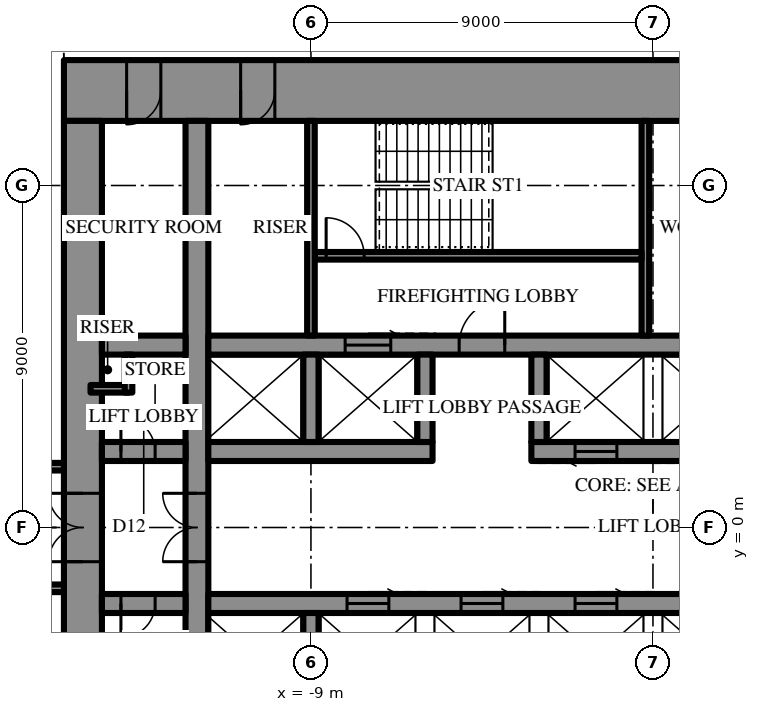
"""IFC4 building model, lengths in metres.
Left out: names, types, materials, properties, quantities, classifications, styles, units other than length and angle.
Written with IfcOpenShell. Run it as: python <this file> out.ifc"""

import sys

from ifc_helpers import new_model, si_unit, direction, frame, frame_2d, origin, place, context, subcontext, project, spatial, rectangle, extrude, element, fill, save


model = new_model("IFC4")
c1 = context("Model", 3, precision=1e-05, world=origin(), true_north=direction((0.0, 1.0)))
c2 = subcontext(c1, "Body", "Model", "MODEL_VIEW")
j1 = project(units=[si_unit("LENGTHUNIT", "METRE"), si_unit("PLANEANGLEUNIT", "RADIAN")], contexts=[c1])
p1 = place(None, origin())
s1 = spatial("IfcSite", under=j1, at=p1, CompositionType="ELEMENT")
p2 = place(p1, origin())
s2 = spatial("IfcBuilding", under=s1, at=p2, CompositionType="ELEMENT")
p3 = place(p2, frame((0.0, 0.0, 295.3)))
s3 = spatial("IfcBuildingStorey", under=s2, at=p3, CompositionType="ELEMENT", Elevation=295.3)
p4 = place(p3, frame((-15.5, 11.5, 0.0), z_axis=(0.0, 0.0, 1.0), x_axis=(1.0, 0.0, 0.0)))
e1 = element("IfcWall", 1, at=p4, inside=s3, PredefinedType="SHEAR", context=c2, shape_type="SweptSolid", body=[
    extrude(rectangle(XDim=31.0, YDim=1.6, at=frame_2d((15.5, 0.0))), origin(), (0.0, 0.0, 1.0), 4.2),
])
p5 = place(p4, frame((16.35, 0.0, 0.0)))
e2 = element("IfcOpeningElement", 2, at=p5, cuts=e1, PredefinedType="OPENING", context=c2, shape_type="SweptSolid", body=[
    extrude(rectangle(XDim=0.9, YDim=2.2, at=frame_2d((0.45, 1.1))), frame((0.0, 0.81, 0.0), z_axis=(0.0, -1.0, 0.0), x_axis=(1.0, 0.0, 0.0)), (0.0, 0.0, 1.0), 1.62),
])
p6 = place(p4, frame((19.35, 0.0, 0.0)))
e3 = element("IfcOpeningElement", 3, at=p6, cuts=e1, PredefinedType="OPENING", context=c2, shape_type="SweptSolid", body=[
    extrude(rectangle(XDim=0.9, YDim=2.2, at=frame_2d((0.45, 1.1))), frame((0.0, 0.81, 0.0), z_axis=(0.0, -1.0, 0.0), x_axis=(1.0, 0.0, 0.0)), (0.0, 0.0, 1.0), 1.62),
])
p7 = place(p4, frame((22.4, 0.0, 0.0)))
e4 = element("IfcOpeningElement", 4, at=p7, cuts=e1, PredefinedType="OPENING", context=c2, shape_type="SweptSolid", body=[
    extrude(rectangle(XDim=1.0, YDim=2.2, at=frame_2d((0.5, 1.1))), frame((0.0, 0.81, 0.0), z_axis=(0.0, -1.0, 0.0), x_axis=(1.0, 0.0, 0.0)), (0.0, 0.0, 1.0), 1.62),
])
p8 = place(p4, frame((1.65, 0.0, 0.0)))
e5 = element("IfcOpeningElement", 5, at=p8, cuts=e1, PredefinedType="OPENING", context=c2, shape_type="SweptSolid", body=[
    extrude(rectangle(XDim=0.9, YDim=2.2, at=frame_2d((0.45, 1.1))), frame((0.0, 0.81, 0.0), z_axis=(0.0, -1.0, 0.0), x_axis=(1.0, 0.0, 0.0)), (0.0, 0.0, 1.0), 1.62),
])
p9 = place(p4, frame((4.65, 0.0, 0.0)))
e6 = element("IfcOpeningElement", 6, at=p9, cuts=e1, PredefinedType="OPENING", context=c2, shape_type="SweptSolid", body=[
    extrude(rectangle(XDim=0.9, YDim=2.2, at=frame_2d((0.45, 1.1))), frame((0.0, 0.81, 0.0), z_axis=(0.0, -1.0, 0.0), x_axis=(1.0, 0.0, 0.0)), (0.0, 0.0, 1.0), 1.62),
])
p10 = place(p4, frame((25.45, 0.0, 0.0)))
e7 = element("IfcOpeningElement", 7, at=p10, cuts=e1, PredefinedType="OPENING", context=c2, shape_type="SweptSolid", body=[
    extrude(rectangle(XDim=0.9, YDim=2.2, at=frame_2d((0.45, 1.1))), frame((0.0, 0.81, 0.0), z_axis=(0.0, -1.0, 0.0), x_axis=(1.0, 0.0, 0.0)), (0.0, 0.0, 1.0), 1.62),
])
p11 = place(p4, frame((28.45, 0.0, 0.0)))
e8 = element("IfcOpeningElement", 8, at=p11, cuts=e1, PredefinedType="OPENING", context=c2, shape_type="SweptSolid", body=[
    extrude(rectangle(XDim=0.9, YDim=2.2, at=frame_2d((0.45, 1.1))), frame((0.0, 0.81, 0.0), z_axis=(0.0, -1.0, 0.0), x_axis=(1.0, 0.0, 0.0)), (0.0, 0.0, 1.0), 1.62),
])
p12 = place(p3, frame((-15.0, 10.7, 0.0), z_axis=(0.0, 0.0, 1.0), x_axis=(0.0, -1.0, 0.0)))
e9 = element("IfcWall", 9, at=p12, inside=s3, PredefinedType="SHEAR", context=c2, shape_type="SweptSolid", body=[
    extrude(rectangle(XDim=21.4, YDim=1.0, at=frame_2d((10.7, 0.0))), origin(), (0.0, 0.0, 1.0), 4.2),
])
p13 = place(p12, frame((9.8, 0.0, 0.0)))
e10 = element("IfcOpeningElement", 10, at=p13, cuts=e9, PredefinedType="OPENING", context=c2, shape_type="SweptSolid", body=[
    extrude(rectangle(XDim=1.8, YDim=2.4, at=frame_2d((0.9, 1.2))), frame((0.0, 0.51, 0.0), z_axis=(0.0, -1.0, 0.0), x_axis=(1.0, 0.0, 0.0)), (0.0, 0.0, 1.0), 1.02),
])
p14 = place(p3, frame((-12.0, -10.7, 0.0), z_axis=(0.0, 0.0, 1.0), x_axis=(0.0, 1.0, 0.0)))
e11 = element("IfcWall", 11, at=p14, inside=s3, PredefinedType="SHEAR", context=c2, shape_type="SweptSolid", body=[
    extrude(rectangle(XDim=21.4, YDim=0.6, at=frame_2d((10.7, 0.0))), origin(), (0.0, 0.0, 1.0), 4.2),
])
p15 = place(p14, frame((9.8, 0.0, 0.0)))
e12 = element("IfcOpeningElement", 12, at=p15, cuts=e11, PredefinedType="OPENING", context=c2, shape_type="SweptSolid", body=[
    extrude(rectangle(XDim=1.8, YDim=2.4, at=frame_2d((0.9, 1.2))), frame((0.0, 0.31, 0.0), z_axis=(0.0, -1.0, 0.0), x_axis=(1.0, 0.0, 0.0)), (0.0, 0.0, 1.0), 0.62),
])
p16 = place(p3, frame((-14.5, 2.0, 0.0), z_axis=(0.0, 0.0, 1.0), x_axis=(1.0, 0.0, 0.0)))
e13 = element("IfcWall", 13, at=p16, inside=s3, PredefinedType="SHEAR", context=c2, shape_type="SweptSolid", body=[
    extrude(rectangle(XDim=2.2, YDim=0.5, at=frame_2d((1.1, 0.0))), origin(), (0.0, 0.0, 1.0), 4.2),
])
p17 = place(p16, frame((0.5, 0.0, 0.0)))
e14 = element("IfcOpeningElement", 14, at=p17, cuts=e13, PredefinedType="OPENING", context=c2, shape_type="SweptSolid", body=[
    extrude(rectangle(XDim=0.9, YDim=2.2, at=frame_2d((0.45, 1.1))), frame((0.0, 0.26, 0.0), z_axis=(0.0, -1.0, 0.0), x_axis=(1.0, 0.0, 0.0)), (0.0, 0.0, 1.0), 0.52),
])
p18 = place(p3, frame((-11.7, 2.0, 0.0), z_axis=(0.0, 0.0, 1.0), x_axis=(1.0, 0.0, 0.0)))
e15 = element("IfcWall", 15, at=p18, inside=s3, PredefinedType="SHEAR", context=c2, shape_type="SweptSolid", body=[
    extrude(rectangle(XDim=5.9, YDim=0.5, at=frame_2d((2.95, 0.0))), origin(), (0.0, 0.0, 1.0), 4.2),
])
p19 = place(p3, frame((-3.2, 2.0, 0.0), z_axis=(0.0, 0.0, 1.0), x_axis=(1.0, 0.0, 0.0)))
e16 = element("IfcWall", 16, at=p19, inside=s3, PredefinedType="SHEAR", context=c2, shape_type="SweptSolid", body=[
    extrude(rectangle(XDim=14.9, YDim=0.5, at=frame_2d((7.45, 0.0))), origin(), (0.0, 0.0, 1.0), 4.2),
])
p20 = place(p19, frame((1.15, 0.0, 0.0)))
e17 = element("IfcOpeningElement", 17, at=p20, cuts=e16, PredefinedType="OPENING", context=c2, shape_type="SweptSolid", body=[
    extrude(rectangle(XDim=1.1, YDim=2.2, at=frame_2d((0.55, 1.1))), frame((0.0, 0.26, 0.0), z_axis=(0.0, -1.0, 0.0), x_axis=(1.0, 0.0, 0.0)), (0.0, 0.0, 1.0), 0.52),
])
p21 = place(p19, frame((4.15, 0.0, 0.0)))
e18 = element("IfcOpeningElement", 18, at=p21, cuts=e16, PredefinedType="OPENING", context=c2, shape_type="SweptSolid", body=[
    extrude(rectangle(XDim=1.1, YDim=2.2, at=frame_2d((0.55, 1.1))), frame((0.0, 0.26, 0.0), z_axis=(0.0, -1.0, 0.0), x_axis=(1.0, 0.0, 0.0)), (0.0, 0.0, 1.0), 0.52),
])
p22 = place(p19, frame((7.15, 0.0, 0.0)))
e19 = element("IfcOpeningElement", 19, at=p22, cuts=e16, PredefinedType="OPENING", context=c2, shape_type="SweptSolid", body=[
    extrude(rectangle(XDim=1.1, YDim=2.2, at=frame_2d((0.55, 1.1))), frame((0.0, 0.26, 0.0), z_axis=(0.0, -1.0, 0.0), x_axis=(1.0, 0.0, 0.0)), (0.0, 0.0, 1.0), 0.52),
])
p23 = place(p19, frame((10.15, 0.0, 0.0)))
e20 = element("IfcOpeningElement", 20, at=p23, cuts=e16, PredefinedType="OPENING", context=c2, shape_type="SweptSolid", body=[
    extrude(rectangle(XDim=1.1, YDim=2.2, at=frame_2d((0.55, 1.1))), frame((0.0, 0.26, 0.0), z_axis=(0.0, -1.0, 0.0), x_axis=(1.0, 0.0, 0.0)), (0.0, 0.0, 1.0), 0.52),
])
p24 = place(p3, frame((-14.5, 4.8, 0.0), z_axis=(0.0, 0.0, 1.0), x_axis=(1.0, 0.0, 0.0)))
e21 = element("IfcWall", 21, at=p24, inside=s3, PredefinedType="SHEAR", context=c2, shape_type="SweptSolid", body=[
    extrude(rectangle(XDim=2.2, YDim=0.5, at=frame_2d((1.1, 0.0))), origin(), (0.0, 0.0, 1.0), 4.2),
])
p25 = place(p3, frame((-11.7, 4.8, 0.0), z_axis=(0.0, 0.0, 1.0), x_axis=(1.0, 0.0, 0.0)))
e22 = element("IfcWall", 22, at=p25, inside=s3, PredefinedType="SHEAR", context=c2, shape_type="SweptSolid", body=[
    extrude(rectangle(XDim=23.4, YDim=0.5, at=frame_2d((11.7, 0.0))), origin(), (0.0, 0.0, 1.0), 4.2),
])
p26 = place(p25, frame((6.6, 0.0, 0.0)))
e23 = element("IfcOpeningElement", 23, at=p26, cuts=e22, PredefinedType="OPENING", context=c2, shape_type="SweptSolid", body=[
    extrude(rectangle(XDim=1.2, YDim=2.2, at=frame_2d((0.6, 1.1))), frame((0.0, 0.26, 0.0), z_axis=(0.0, -1.0, 0.0), x_axis=(1.0, 0.0, 0.0)), (0.0, 0.0, 1.0), 0.52),
])
p27 = place(p25, frame((3.6, 0.0, 0.0)))
e24 = element("IfcOpeningElement", 24, at=p27, cuts=e22, PredefinedType="OPENING", context=c2, shape_type="SweptSolid", body=[
    extrude(rectangle(XDim=1.2, YDim=2.2, at=frame_2d((0.6, 1.1))), frame((0.0, 0.26, 0.0), z_axis=(0.0, -1.0, 0.0), x_axis=(1.0, 0.0, 0.0)), (0.0, 0.0, 1.0), 0.52),
])
for number, where, z_axis, x_axis in (
    (25, (-9.0, 2.25, 0.0), (0.0, 0.0, 1.0), (0.0, 1.0, 0.0)),
    (26, (-6.0, 2.25, 0.0), (0.0, 0.0, 1.0), (0.0, 1.0, 0.0)),
    (27, (-3.0, 2.25, 0.0), (0.0, 0.0, 1.0), (0.0, 1.0, 0.0)),
):
    element("IfcWall", number, at=place(p3, frame(where, z_axis=z_axis, x_axis=x_axis)), inside=s3, PredefinedType="SHEAR", context=c2, shape_type="SweptSolid", body=[
        extrude(rectangle(XDim=2.3, YDim=0.4, at=frame_2d((1.15, 0.0))), origin(), (0.0, 0.0, 1.0), 4.2),
    ])
p28 = place(p3, frame((-0.2, 5.05, 0.0), z_axis=(0.0, 0.0, 1.0), x_axis=(0.0, 1.0, 0.0)))
e28 = element("IfcWall", 28, at=p28, inside=s3, PredefinedType="SHEAR", context=c2, shape_type="SweptSolid", body=[
    extrude(rectangle(XDim=5.65, YDim=0.2, at=frame_2d((2.825, 0.0))), origin(), (0.0, 0.0, 1.0), 4.2),
])
p29 = place(p3, frame((-8.9, 7.15, 0.0), z_axis=(0.0, 0.0, 1.0), x_axis=(1.0, 0.0, 0.0)))
e29 = element("IfcWall", 29, at=p29, inside=s3, PredefinedType="SHEAR", context=c2, shape_type="SweptSolid", body=[
    extrude(rectangle(XDim=8.6, YDim=0.2, at=frame_2d((4.3, 0.0))), origin(), (0.0, 0.0, 1.0), 4.2),
])
p30 = place(p29, frame((0.3, 0.0, 0.0)))
e30 = element("IfcOpeningElement", 30, at=p30, cuts=e29, PredefinedType="OPENING", context=c2, shape_type="SweptSolid", body=[
    extrude(rectangle(XDim=1.0, YDim=2.2, at=frame_2d((0.5, 1.1))), frame((0.0, 0.11, 0.0), z_axis=(0.0, -1.0, 0.0), x_axis=(1.0, 0.0, 0.0)), (0.0, 0.0, 1.0), 0.22),
])
p31 = place(p3, frame((3.2, -2.0, 0.0), z_axis=(0.0, 0.0, 1.0), x_axis=(-1.0, 0.0, 0.0)))
e31 = element("IfcWall", 31, at=p31, inside=s3, PredefinedType="SHEAR", context=c2, shape_type="SweptSolid", body=[
    extrude(rectangle(XDim=14.9, YDim=0.5, at=frame_2d((7.45, 0.0))), origin(), (0.0, 0.0, 1.0), 4.2),
])
p32 = place(p31, frame((1.15, 0.0, 0.0)))
e32 = element("IfcOpeningElement", 32, at=p32, cuts=e31, PredefinedType="OPENING", context=c2, shape_type="SweptSolid", body=[
    extrude(rectangle(XDim=1.1, YDim=2.2, at=frame_2d((0.55, 1.1))), frame((0.0, 0.26, 0.0), z_axis=(0.0, -1.0, 0.0), x_axis=(1.0, 0.0, 0.0)), (0.0, 0.0, 1.0), 0.52),
])
p33 = place(p31, frame((4.15, 0.0, 0.0)))
e33 = element("IfcOpeningElement", 33, at=p33, cuts=e31, PredefinedType="OPENING", context=c2, shape_type="SweptSolid", body=[
    extrude(rectangle(XDim=1.1, YDim=2.2, at=frame_2d((0.55, 1.1))), frame((0.0, 0.26, 0.0), z_axis=(0.0, -1.0, 0.0), x_axis=(1.0, 0.0, 0.0)), (0.0, 0.0, 1.0), 0.52),
])
p34 = place(p31, frame((7.15, 0.0, 0.0)))
e34 = element("IfcOpeningElement", 34, at=p34, cuts=e31, PredefinedType="OPENING", context=c2, shape_type="SweptSolid", body=[
    extrude(rectangle(XDim=1.1, YDim=2.2, at=frame_2d((0.55, 1.1))), frame((0.0, 0.26, 0.0), z_axis=(0.0, -1.0, 0.0), x_axis=(1.0, 0.0, 0.0)), (0.0, 0.0, 1.0), 0.52),
])
p35 = place(p31, frame((10.15, 0.0, 0.0)))
e35 = element("IfcOpeningElement", 35, at=p35, cuts=e31, PredefinedType="OPENING", context=c2, shape_type="SweptSolid", body=[
    extrude(rectangle(XDim=1.1, YDim=2.2, at=frame_2d((0.55, 1.1))), frame((0.0, 0.26, 0.0), z_axis=(0.0, -1.0, 0.0), x_axis=(1.0, 0.0, 0.0)), (0.0, 0.0, 1.0), 0.52),
])
p36 = place(p3, frame((-12.3, -2.0, 0.0), z_axis=(0.0, 0.0, 1.0), x_axis=(-1.0, 0.0, 0.0)))
e36 = element("IfcWall", 36, at=p36, inside=s3, PredefinedType="SHEAR", context=c2, shape_type="SweptSolid", body=[
    extrude(rectangle(XDim=2.2, YDim=0.5, at=frame_2d((1.1, 0.0))), origin(), (0.0, 0.0, 1.0), 4.2),
])
p37 = place(p36, frame((0.8, 0.0, 0.0)))
e37 = element("IfcOpeningElement", 37, at=p37, cuts=e36, PredefinedType="OPENING", context=c2, shape_type="SweptSolid", body=[
    extrude(rectangle(XDim=0.9, YDim=2.2, at=frame_2d((0.45, 1.1))), frame((0.0, 0.26, 0.0), z_axis=(0.0, -1.0, 0.0), x_axis=(1.0, 0.0, 0.0)), (0.0, 0.0, 1.0), 0.52),
])
p38 = place(p3, frame((-9.0, -2.25, 0.0), z_axis=(0.0, 0.0, 1.0), x_axis=(0.0, -1.0, 0.0)))
e38 = element("IfcWall", 38, at=p38, inside=s3, PredefinedType="SHEAR", context=c2, shape_type="SweptSolid", body=[
    extrude(rectangle(XDim=2.3, YDim=0.4, at=frame_2d((1.15, 0.0))), origin(), (0.0, 0.0, 1.0), 4.2),
])
p39 = place(p3, frame((-9.0, 5.05, 0.0), z_axis=(0.0, 0.0, 1.0), x_axis=(0.0, 1.0, 0.0)))
e39 = element("IfcWall", 39, at=p39, inside=s3, PredefinedType="PARTITIONING", context=c2, shape_type="SweptSolid", body=[
    extrude(rectangle(XDim=5.65, YDim=0.2, at=frame_2d((2.825, 0.0))), origin(), (0.0, 0.0, 1.0), 3.9),
])
for number, where, z_axis, x_axis in (
    (40, (-14.8, 3.65, 0.0), (0.0, 0.0, 1.0), (1.0, 0.0, 0.0)),
    (41, (-13.8, 3.55, 0.0), (0.0, 0.0, 1.0), (0.0, 1.0, 0.0)),
):
    element("IfcWall", number, at=place(p3, frame(where, z_axis=z_axis, x_axis=x_axis)), inside=s3, PredefinedType="PARTITIONING", context=c2, shape_type="SweptSolid", body=[
        extrude(rectangle(XDim=1.0, YDim=0.2, at=frame_2d((0.5, 0.0))), origin(), (0.0, 0.0, 1.0), 3.9),
    ])
p40 = place(p3, frame((-15.5, 1.6, 0.0), z_axis=(0.0, 0.0, 1.0), x_axis=(-1.0, 0.0, 0.0)))
e42 = element("IfcWall", 42, at=p40, inside=s3, PredefinedType="PARTITIONING", context=c2, shape_type="SweptSolid", body=[
    extrude(rectangle(XDim=10.7, YDim=0.2, at=frame_2d((5.35, 0.0))), origin(), (0.0, 0.0, 1.0), 3.9),
])
p41 = place(p40, frame((2.71, 0.0, 0.0)))
e43 = element("IfcOpeningElement", 43, at=p41, cuts=e42, PredefinedType="OPENING", context=c2, shape_type="SweptSolid", body=[
    extrude(rectangle(XDim=1.0, YDim=2.2, at=frame_2d((0.5, 1.1))), frame((0.0, 0.11, 0.0), z_axis=(0.0, -1.0, 0.0), x_axis=(1.0, 0.0, 0.0)), (0.0, 0.0, 1.0), 0.22),
])
p42 = place(p3, frame((-15.5, -1.6, 0.0), z_axis=(0.0, 0.0, 1.0), x_axis=(-1.0, 0.0, 0.0)))
e44 = element("IfcWall", 44, at=p42, inside=s3, PredefinedType="PARTITIONING", context=c2, shape_type="SweptSolid", body=[
    extrude(rectangle(XDim=10.7, YDim=0.2, at=frame_2d((5.35, 0.0))), origin(), (0.0, 0.0, 1.0), 3.9),
])
p43 = place(p42, frame((2.71, 0.0, 0.0)))
e45 = element("IfcOpeningElement", 45, at=p43, cuts=e44, PredefinedType="OPENING", context=c2, shape_type="SweptSolid", body=[
    extrude(rectangle(XDim=1.0, YDim=2.2, at=frame_2d((0.5, 1.1))), frame((0.0, 0.11, 0.0), z_axis=(0.0, -1.0, 0.0), x_axis=(1.0, 0.0, 0.0)), (0.0, 0.0, 1.0), 0.22),
])
p44 = place(p13, frame((1.8, 0.0, 0.0), z_axis=(0.0, 0.0, 1.0), x_axis=(-1.0, 0.0, 0.0)))
e46 = element("IfcDoor", 46, at=p44, inside=s3, OperationType="DOUBLE_DOOR_SINGLE_SWING", PredefinedType="DOOR", context=c2, shape_type="SweptSolid", body=[
    extrude(rectangle(XDim=1.8, YDim=2.4, at=frame_2d((0.9, 1.2))), frame((0.0, 0.025, 0.0), z_axis=(0.0, -1.0, 0.0), x_axis=(1.0, 0.0, 0.0)), (0.0, 0.0, 1.0), 0.05),
])
fill(e10, e46)
p45 = place(p26, origin())
e47 = element("IfcDoor", 47, at=p45, inside=s3, OperationType="SINGLE_SWING_LEFT", PredefinedType="DOOR", context=c2, shape_type="SweptSolid", body=[
    extrude(rectangle(XDim=1.2, YDim=2.2, at=frame_2d((0.6, 1.1))), frame((0.0, 0.025, 0.0), z_axis=(0.0, -1.0, 0.0), x_axis=(1.0, 0.0, 0.0)), (0.0, 0.0, 1.0), 0.05),
])
fill(e23, e47)
p46 = place(p30, origin())
e48 = element("IfcDoor", 48, at=p46, inside=s3, OperationType="SINGLE_SWING_RIGHT", PredefinedType="DOOR", context=c2, shape_type="SweptSolid", body=[
    extrude(rectangle(XDim=1.0, YDim=2.2, at=frame_2d((0.5, 1.1))), frame((0.0, 0.025, 0.0), z_axis=(0.0, -1.0, 0.0), x_axis=(1.0, 0.0, 0.0)), (0.0, 0.0, 1.0), 0.05),
])
fill(e30, e48)
p47 = place(p8, frame((0.9, 0.0, 0.0), z_axis=(0.0, 0.0, 1.0), x_axis=(-1.0, 0.0, 0.0)))
e49 = element("IfcDoor", 49, at=p47, inside=s3, OperationType="SINGLE_SWING_LEFT", PredefinedType="DOOR", context=c2, shape_type="SweptSolid", body=[
    extrude(rectangle(XDim=0.9, YDim=2.2, at=frame_2d((0.45, 1.1))), frame((0.0, 0.025, 0.0), z_axis=(0.0, -1.0, 0.0), x_axis=(1.0, 0.0, 0.0)), (0.0, 0.0, 1.0), 0.05),
])
fill(e5, e49)
p48 = place(p9, frame((0.9, 0.0, 0.0), z_axis=(0.0, 0.0, 1.0), x_axis=(-1.0, 0.0, 0.0)))
e50 = element("IfcDoor", 50, at=p48, inside=s3, OperationType="SINGLE_SWING_LEFT", PredefinedType="DOOR", context=c2, shape_type="SweptSolid", body=[
    extrude(rectangle(XDim=0.9, YDim=2.2, at=frame_2d((0.45, 1.1))), frame((0.0, 0.025, 0.0), z_axis=(0.0, -1.0, 0.0), x_axis=(1.0, 0.0, 0.0)), (0.0, 0.0, 1.0), 0.05),
])
fill(e6, e50)
p49 = place(p17, origin())
e51 = element("IfcDoor", 51, at=p49, inside=s3, OperationType="SINGLE_SWING_RIGHT", PredefinedType="DOOR", context=c2, shape_type="SweptSolid", body=[
    extrude(rectangle(XDim=0.9, YDim=2.2, at=frame_2d((0.45, 1.1))), frame((0.0, 0.025, 0.0), z_axis=(0.0, -1.0, 0.0), x_axis=(1.0, 0.0, 0.0)), (0.0, 0.0, 1.0), 0.05),
])
fill(e14, e51)
p50 = place(p37, origin())
e52 = element("IfcDoor", 52, at=p50, inside=s3, OperationType="SINGLE_SWING_LEFT", PredefinedType="DOOR", context=c2, shape_type="SweptSolid", body=[
    extrude(rectangle(XDim=0.9, YDim=2.2, at=frame_2d((0.45, 1.1))), frame((0.0, 0.025, 0.0), z_axis=(0.0, -1.0, 0.0), x_axis=(1.0, 0.0, 0.0)), (0.0, 0.0, 1.0), 0.05),
])
fill(e37, e52)
p51 = place(p15, origin())
e53 = element("IfcDoor", 53, at=p51, inside=s3, OperationType="DOUBLE_DOOR_SINGLE_SWING", PredefinedType="DOOR", context=c2, shape_type="SweptSolid", body=[
    extrude(rectangle(XDim=1.8, YDim=2.4, at=frame_2d((0.9, 1.2))), frame((0.0, 0.025, 0.0), z_axis=(0.0, -1.0, 0.0), x_axis=(1.0, 0.0, 0.0)), (0.0, 0.0, 1.0), 0.05),
])
fill(e12, e53)
p52 = place(p27, origin())
e54 = element("IfcDoor", 54, at=p52, inside=s3, OperationType="SLIDING_TO_LEFT", PredefinedType="DOOR", context=c2, shape_type="SweptSolid", body=[
    extrude(rectangle(XDim=1.2, YDim=2.2, at=frame_2d((0.6, 1.1))), frame((0.0, 0.025, 0.0), z_axis=(0.0, -1.0, 0.0), x_axis=(1.0, 0.0, 0.0)), (0.0, 0.0, 1.0), 0.05),
])
fill(e24, e54)
p53 = place(p20, frame((1.1, 0.0, 0.0), z_axis=(0.0, 0.0, 1.0), x_axis=(-1.0, 0.0, 0.0)))
e55 = element("IfcDoor", 55, at=p53, inside=s3, OperationType="SLIDING_TO_LEFT", PredefinedType="DOOR", context=c2, shape_type="SweptSolid", body=[
    extrude(rectangle(XDim=1.1, YDim=2.2, at=frame_2d((0.55, 1.1))), frame((0.0, 0.025, 0.0), z_axis=(0.0, -1.0, 0.0), x_axis=(1.0, 0.0, 0.0)), (0.0, 0.0, 1.0), 0.05),
])
fill(e17, e55)
p54 = place(p33, frame((1.1, 0.0, 0.0), z_axis=(0.0, 0.0, 1.0), x_axis=(-1.0, 0.0, 0.0)))
e56 = element("IfcDoor", 56, at=p54, inside=s3, OperationType="SLIDING_TO_LEFT", PredefinedType="DOOR", context=c2, shape_type="SweptSolid", body=[
    extrude(rectangle(XDim=1.1, YDim=2.2, at=frame_2d((0.55, 1.1))), frame((0.0, 0.025, 0.0), z_axis=(0.0, -1.0, 0.0), x_axis=(1.0, 0.0, 0.0)), (0.0, 0.0, 1.0), 0.05),
])
fill(e33, e56)
p55 = place(p34, frame((1.1, 0.0, 0.0), z_axis=(0.0, 0.0, 1.0), x_axis=(-1.0, 0.0, 0.0)))
e57 = element("IfcDoor", 57, at=p55, inside=s3, OperationType="SLIDING_TO_LEFT", PredefinedType="DOOR", context=c2, shape_type="SweptSolid", body=[
    extrude(rectangle(XDim=1.1, YDim=2.2, at=frame_2d((0.55, 1.1))), frame((0.0, 0.025, 0.0), z_axis=(0.0, -1.0, 0.0), x_axis=(1.0, 0.0, 0.0)), (0.0, 0.0, 1.0), 0.05),
])
fill(e34, e57)
p56 = place(p35, frame((1.1, 0.0, 0.0), z_axis=(0.0, 0.0, 1.0), x_axis=(-1.0, 0.0, 0.0)))
e58 = element("IfcDoor", 58, at=p56, inside=s3, OperationType="SLIDING_TO_LEFT", PredefinedType="DOOR", context=c2, shape_type="SweptSolid", body=[
    extrude(rectangle(XDim=1.1, YDim=2.2, at=frame_2d((0.55, 1.1))), frame((0.0, 0.025, 0.0), z_axis=(0.0, -1.0, 0.0), x_axis=(1.0, 0.0, 0.0)), (0.0, 0.0, 1.0), 0.05),
])
fill(e35, e58)
save(model, sys.argv[1])
